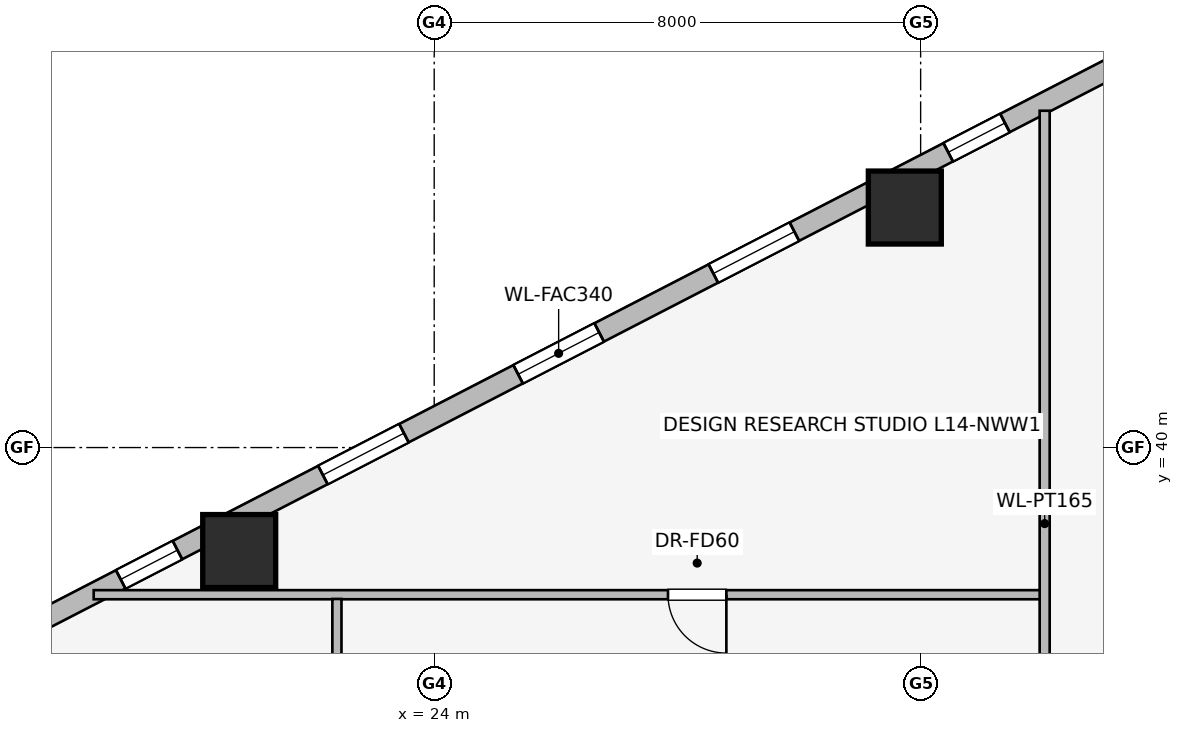
"""IFC4 building model, lengths in metres.
Left out: names, types, materials, properties, quantities, classifications, styles, units other than length and angle.
Written with IfcOpenShell. Run it as: python <this file> out.ifc"""

import sys

from ifc_helpers import new_model, si_unit, direction, frame, frame_2d, origin, origin_2d, place, context, subcontext, project, spatial, rectangle, extrude, element, fill, save


model = new_model("IFC4")
c1 = context("Model", 3, precision=1e-05, world=origin(), true_north=direction((0.0, 1.0)))
c2 = subcontext(c1, "Body", "Model", "MODEL_VIEW")
j1 = project(units=[si_unit("LENGTHUNIT", "METRE"), si_unit("PLANEANGLEUNIT", "RADIAN")], contexts=[c1])
p1 = place(None, origin())
s1 = spatial("IfcSite", under=j1, at=p1, CompositionType="ELEMENT")
p2 = place(p1, origin())
s2 = spatial("IfcBuilding", under=s1, at=p2, CompositionType="ELEMENT")
p3 = place(p2, frame((0.0, 0.0, 56.2)))
s3 = spatial("IfcBuildingStorey", under=s2, at=p3, CompositionType="ELEMENT", Elevation=56.2)
for number, where, z_axis, x_axis in (
    (1, (31.74, 43.947, 0.0), (0.0, 0.0, 1.0), (1.0, 0.0, 0.0)),
    (2, (20.793, 38.298, 0.0), (0.0, 0.0, 1.0), (1.0, 0.0, 0.0)),
):
    element("IfcColumn", number, at=place(p3, frame(where, z_axis=z_axis, x_axis=x_axis)), inside=s3, PredefinedType="COLUMN", context=c2, shape_type="SweptSolid", body=[
        extrude(rectangle(XDim=1.2, YDim=1.2, at=origin_2d()), origin(), (0.0, 0.0, 1.0), 3.65),
    ])
p4 = place(p3, frame((16.924, 36.841, 0.0), z_axis=(0.0, 0.0, 1.0), x_axis=(0.888634413993, 0.458616264721, 0.0)))
e3 = element("IfcWall", 3, at=p4, inside=s3, PredefinedType="STANDARD", context=c2, shape_type="SweptSolid", body=[
    extrude(rectangle(XDim=20.531, YDim=0.34, at=frame_2d((10.266, 0.0))), origin(), (0.0, 0.0, 1.0), 2.654),
])
p5 = place(p4, frame((2.161, 0.0, 0.75)))
e4 = element("IfcOpeningElement", 4, at=p5, cuts=e3, PredefinedType="OPENING", context=c2, shape_type="SweptSolid", body=[
    extrude(rectangle(XDim=1.05, YDim=1.4, at=frame_2d((0.525, 0.7))), frame((0.0, 0.18, 0.0), z_axis=(0.0, -1.0, 0.0), x_axis=(1.0, 0.0, 0.0)), (0.0, 0.0, 1.0), 0.36),
])
p6 = place(p4, frame((5.903, 0.0, 0.75)))
e5 = element("IfcOpeningElement", 5, at=p6, cuts=e3, PredefinedType="OPENING", context=c2, shape_type="SweptSolid", body=[
    extrude(rectangle(XDim=1.5, YDim=1.5, at=frame_2d((0.75, 0.75))), frame((0.0, 0.18, 0.0), z_axis=(0.0, -1.0, 0.0), x_axis=(1.0, 0.0, 0.0)), (0.0, 0.0, 1.0), 0.36),
])
p7 = place(p4, frame((9.516, 0.0, 0.75)))
e6 = element("IfcOpeningElement", 6, at=p7, cuts=e3, PredefinedType="OPENING", context=c2, shape_type="SweptSolid", body=[
    extrude(rectangle(XDim=1.5, YDim=1.5, at=frame_2d((0.75, 0.75))), frame((0.0, 0.18, 0.0), z_axis=(0.0, -1.0, 0.0), x_axis=(1.0, 0.0, 0.0)), (0.0, 0.0, 1.0), 0.36),
])
p8 = place(p4, frame((13.129, 0.0, 0.75)))
e7 = element("IfcOpeningElement", 7, at=p8, cuts=e3, PredefinedType="OPENING", context=c2, shape_type="SweptSolid", body=[
    extrude(rectangle(XDim=1.5, YDim=1.5, at=frame_2d((0.75, 0.75))), frame((0.0, 0.18, 0.0), z_axis=(0.0, -1.0, 0.0), x_axis=(1.0, 0.0, 0.0)), (0.0, 0.0, 1.0), 0.36),
])
p9 = place(p4, frame((17.476, 0.0, 0.75)))
e8 = element("IfcOpeningElement", 8, at=p9, cuts=e3, PredefinedType="OPENING", context=c2, shape_type="SweptSolid", body=[
    extrude(rectangle(XDim=1.05, YDim=1.4, at=frame_2d((0.525, 0.7))), frame((0.0, 0.18, 0.0), z_axis=(0.0, -1.0, 0.0), x_axis=(1.0, 0.0, 0.0)), (0.0, 0.0, 1.0), 0.36),
])
p10 = place(p3, frame((34.0, 37.58, 0.0), z_axis=(0.0, 0.0, 1.0), x_axis=(-1.0, 0.0, 0.0)))
e9 = element("IfcWall", 9, at=p10, inside=s3, PredefinedType="PARTITIONING", context=c2, shape_type="SweptSolid", body=[
    extrude(rectangle(XDim=15.6, YDim=0.15, at=frame_2d((7.8, 0.0))), origin(), (0.0, 0.0, 1.0), 3.36),
])
p11 = place(p10, frame((5.195, 0.0, 0.0)))
e10 = element("IfcOpeningElement", 10, at=p11, cuts=e9, PredefinedType="OPENING", context=c2, shape_type="SweptSolid", body=[
    extrude(rectangle(XDim=0.96, YDim=2.0, at=frame_2d((0.48, 1.0))), frame((0.0, 0.085, 0.0), z_axis=(0.0, -1.0, 0.0), x_axis=(1.0, 0.0, 0.0)), (0.0, 0.0, 1.0), 0.17),
])
p12 = place(p3, frame((34.04, 31.96, 0.0), z_axis=(0.0, 0.0, 1.0), x_axis=(0.0, 1.0, 0.0)))
e11 = element("IfcWall", 11, at=p12, inside=s3, PredefinedType="PARTITIONING", context=c2, shape_type="SweptSolid", body=[
    extrude(rectangle(XDim=13.579, YDim=0.165, at=frame_2d((6.79, 0.0))), origin(), (0.0, 0.0, 1.0), 3.36),
])
p13 = place(p3, frame((22.4, 36.08, 0.0), z_axis=(0.0, 0.0, 1.0), x_axis=(0.0, 1.0, 0.0)))
e12 = element("IfcWall", 12, at=p13, inside=s3, PredefinedType="PARTITIONING", context=c2, shape_type="SweptSolid", body=[
    extrude(rectangle(XDim=1.43, YDim=0.15, at=frame_2d((0.715, 0.0))), origin(), (0.0, 0.0, 1.0), 3.36),
])
p14 = place(p5, origin())
e13 = element("IfcWindow", 13, at=p14, inside=s3, PartitioningType="SINGLE_PANEL", PredefinedType="WINDOW", context=c2, shape_type="SweptSolid", body=[
    extrude(rectangle(XDim=1.05, YDim=1.4, at=frame_2d((0.525, 0.7))), frame((0.0, 0.03, 0.0), z_axis=(0.0, -1.0, 0.0), x_axis=(1.0, 0.0, 0.0)), (0.0, 0.0, 1.0), 0.06),
])
fill(e4, e13)
p15 = place(p6, origin())
e14 = element("IfcWindow", 14, at=p15, inside=s3, PartitioningType="SINGLE_PANEL", PredefinedType="WINDOW", context=c2, shape_type="SweptSolid", body=[
    extrude(rectangle(XDim=1.5, YDim=1.5, at=frame_2d((0.75, 0.75))), frame((0.0, 0.03, 0.0), z_axis=(0.0, -1.0, 0.0), x_axis=(1.0, 0.0, 0.0)), (0.0, 0.0, 1.0), 0.06),
])
fill(e5, e14)
p16 = place(p7, origin())
e15 = element("IfcWindow", 15, at=p16, inside=s3, PartitioningType="SINGLE_PANEL", PredefinedType="WINDOW", context=c2, shape_type="SweptSolid", body=[
    extrude(rectangle(XDim=1.5, YDim=1.5, at=frame_2d((0.75, 0.75))), frame((0.0, 0.03, 0.0), z_axis=(0.0, -1.0, 0.0), x_axis=(1.0, 0.0, 0.0)), (0.0, 0.0, 1.0), 0.06),
])
fill(e6, e15)
p17 = place(p8, origin())
e16 = element("IfcWindow", 16, at=p17, inside=s3, PartitioningType="SINGLE_PANEL", PredefinedType="WINDOW", context=c2, shape_type="SweptSolid", body=[
    extrude(rectangle(XDim=1.5, YDim=1.5, at=frame_2d((0.75, 0.75))), frame((0.0, 0.03, 0.0), z_axis=(0.0, -1.0, 0.0), x_axis=(1.0, 0.0, 0.0)), (0.0, 0.0, 1.0), 0.06),
])
fill(e7, e16)
p18 = place(p9, origin())
e17 = element("IfcWindow", 17, at=p18, inside=s3, PartitioningType="SINGLE_PANEL", PredefinedType="WINDOW", context=c2, shape_type="SweptSolid", body=[
    extrude(rectangle(XDim=1.05, YDim=1.4, at=frame_2d((0.525, 0.7))), frame((0.0, 0.03, 0.0), z_axis=(0.0, -1.0, 0.0), x_axis=(1.0, 0.0, 0.0)), (0.0, 0.0, 1.0), 0.06),
])
fill(e8, e17)
p19 = place(p11, origin())
e18 = element("IfcDoor", 18, at=p19, inside=s3, OperationType="SINGLE_SWING_LEFT", PredefinedType="DOOR", context=c2, shape_type="SweptSolid", body=[
    extrude(rectangle(XDim=0.96, YDim=2.0, at=frame_2d((0.48, 1.0))), frame((0.0, 0.025, 0.0), z_axis=(0.0, -1.0, 0.0), x_axis=(1.0, 0.0, 0.0)), (0.0, 0.0, 1.0), 0.05),
])
fill(e10, e18)
save(model, sys.argv[1])
